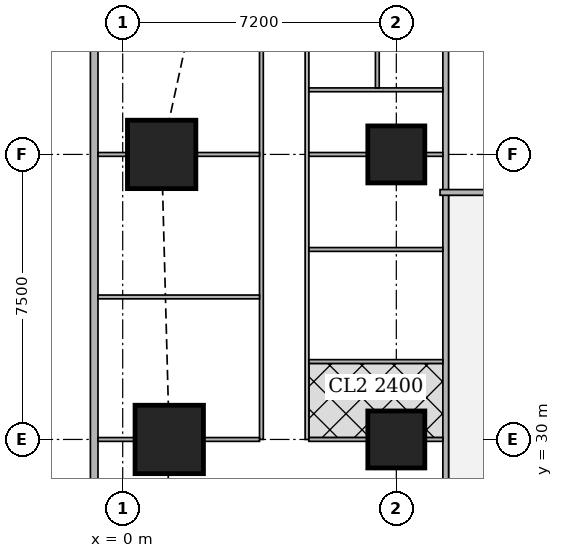
"""IFC4 building model, lengths in metres.
Left out: names, types, materials, properties, quantities, classifications, styles, units other than length and angle.
Written with IfcOpenShell. Run it as: python <this file> out.ifc"""

import sys

from ifc_helpers import new_model, si_unit, direction, frame, frame_2d, origin, origin_2d, place, context, subcontext, project, spatial, rectangle, extrude, element, fill, save


model = new_model("IFC4")
c1 = context("Model", 3, precision=1e-05, world=origin(), true_north=direction((0.0, 1.0)))
c2 = subcontext(c1, "Body", "Model", "MODEL_VIEW")
j1 = project(units=[si_unit("LENGTHUNIT", "METRE"), si_unit("PLANEANGLEUNIT", "RADIAN")], contexts=[c1])
p1 = place(None, origin())
s1 = spatial("IfcSite", under=j1, at=p1, CompositionType="ELEMENT")
p2 = place(p1, origin())
s2 = spatial("IfcBuilding", under=s1, at=p2, CompositionType="ELEMENT")
p3 = place(p2, frame((0.0, 0.0, 158.3)))
s3 = spatial("IfcBuildingStorey", under=s2, at=p3, CompositionType="ELEMENT", Elevation=158.3)
p4 = place(p3, frame((1.225, 30.0, 0.0), z_axis=(0.0, 0.0, 1.0), x_axis=(1.0, 0.0, 0.0)))
e1 = element("IfcColumn", 1, at=p4, inside=s3, PredefinedType="COLUMN", context=c2, shape_type="SweptSolid", body=[
    extrude(rectangle(XDim=1.8, YDim=1.8, at=origin_2d()), origin(), (0.0, 0.0, 1.0), 3.75),
])
p5 = place(p3, frame((7.2, 30.0, 0.0), z_axis=(0.0, 0.0, 1.0), x_axis=(1.0, 0.0, 0.0)))
e2 = element("IfcColumn", 2, at=p5, inside=s3, PredefinedType="COLUMN", context=c2, shape_type="SweptSolid", body=[
    extrude(rectangle(XDim=1.5, YDim=1.5, at=origin_2d()), origin(), (0.0, 0.0, 1.0), 3.75),
])
p6 = place(p3, frame((1.025, 37.5, 0.0), z_axis=(0.0, 0.0, 1.0), x_axis=(1.0, 0.0, 0.0)))
e3 = element("IfcColumn", 3, at=p6, inside=s3, PredefinedType="COLUMN", context=c2, shape_type="SweptSolid", body=[
    extrude(rectangle(XDim=1.8, YDim=1.8, at=origin_2d()), origin(), (0.0, 0.0, 1.0), 3.75),
])
p7 = place(p3, frame((7.2, 37.5, 0.0), z_axis=(0.0, 0.0, 1.0), x_axis=(1.0, 0.0, 0.0)))
e4 = element("IfcColumn", 4, at=p7, inside=s3, PredefinedType="COLUMN", context=c2, shape_type="SweptSolid", body=[
    extrude(rectangle(XDim=1.5, YDim=1.5, at=origin_2d()), origin(), (0.0, 0.0, 1.0), 3.75),
])
p8 = place(p3, frame((-0.75, 42.837, 0.0), z_axis=(0.0, 0.0, 1.0), x_axis=(0.0, -1.0, 0.0)))
e5 = element("IfcWall", 5, at=p8, inside=s3, PredefinedType="SOLIDWALL", context=c2, shape_type="SweptSolid", body=[
    extrude(rectangle(XDim=40.674, YDim=0.2, at=frame_2d((20.337, 0.0))), origin(), (0.0, 0.0, 1.0), 3.5),
])
p9 = place(p8, frame((1.78, 0.0, 0.9)))
e6 = element("IfcOpeningElement", 6, at=p9, cuts=e5, PredefinedType="OPENING", context=c2, shape_type="SweptSolid", body=[
    extrude(rectangle(XDim=1.8, YDim=1.5, at=frame_2d((0.9, 0.75))), frame((0.0, 0.11, 0.0), z_axis=(0.0, -1.0, 0.0), x_axis=(1.0, 0.0, 0.0)), (0.0, 0.0, 1.0), 0.22),
])
p10 = place(p8, frame((6.312, 0.0, 0.9)))
e7 = element("IfcOpeningElement", 7, at=p10, cuts=e5, PredefinedType="OPENING", context=c2, shape_type="SweptSolid", body=[
    extrude(rectangle(XDim=1.8, YDim=1.5, at=frame_2d((0.9, 0.75))), frame((0.0, 0.11, 0.0), z_axis=(0.0, -1.0, 0.0), x_axis=(1.0, 0.0, 0.0)), (0.0, 0.0, 1.0), 0.22),
])
p11 = place(p8, frame((10.062, 0.0, 0.9)))
e8 = element("IfcOpeningElement", 8, at=p11, cuts=e5, PredefinedType="OPENING", context=c2, shape_type="SweptSolid", body=[
    extrude(rectangle(XDim=1.8, YDim=1.5, at=frame_2d((0.9, 0.75))), frame((0.0, 0.11, 0.0), z_axis=(0.0, -1.0, 0.0), x_axis=(1.0, 0.0, 0.0)), (0.0, 0.0, 1.0), 0.22),
])
p12 = place(p8, frame((13.812, 0.0, 0.9)))
e9 = element("IfcOpeningElement", 9, at=p12, cuts=e5, PredefinedType="OPENING", context=c2, shape_type="SweptSolid", body=[
    extrude(rectangle(XDim=1.8, YDim=1.5, at=frame_2d((0.9, 0.75))), frame((0.0, 0.11, 0.0), z_axis=(0.0, -1.0, 0.0), x_axis=(1.0, 0.0, 0.0)), (0.0, 0.0, 1.0), 0.22),
])
p13 = place(p8, frame((17.562, 0.0, 0.9)))
e10 = element("IfcOpeningElement", 10, at=p13, cuts=e5, PredefinedType="OPENING", context=c2, shape_type="SweptSolid", body=[
    extrude(rectangle(XDim=1.8, YDim=1.5, at=frame_2d((0.9, 0.75))), frame((0.0, 0.11, 0.0), z_axis=(0.0, -1.0, 0.0), x_axis=(1.0, 0.0, 0.0)), (0.0, 0.0, 1.0), 0.22),
])
p14 = place(p8, frame((21.312, 0.0, 0.9)))
e11 = element("IfcOpeningElement", 11, at=p14, cuts=e5, PredefinedType="OPENING", context=c2, shape_type="SweptSolid", body=[
    extrude(rectangle(XDim=1.8, YDim=1.5, at=frame_2d((0.9, 0.75))), frame((0.0, 0.11, 0.0), z_axis=(0.0, -1.0, 0.0), x_axis=(1.0, 0.0, 0.0)), (0.0, 0.0, 1.0), 0.22),
])
p15 = place(p8, frame((25.062, 0.0, 0.9)))
e12 = element("IfcOpeningElement", 12, at=p15, cuts=e5, PredefinedType="OPENING", context=c2, shape_type="SweptSolid", body=[
    extrude(rectangle(XDim=1.8, YDim=1.5, at=frame_2d((0.9, 0.75))), frame((0.0, 0.11, 0.0), z_axis=(0.0, -1.0, 0.0), x_axis=(1.0, 0.0, 0.0)), (0.0, 0.0, 1.0), 0.22),
])
p16 = place(p8, frame((28.812, 0.0, 0.9)))
e13 = element("IfcOpeningElement", 13, at=p16, cuts=e5, PredefinedType="OPENING", context=c2, shape_type="SweptSolid", body=[
    extrude(rectangle(XDim=1.8, YDim=1.5, at=frame_2d((0.9, 0.75))), frame((0.0, 0.11, 0.0), z_axis=(0.0, -1.0, 0.0), x_axis=(1.0, 0.0, 0.0)), (0.0, 0.0, 1.0), 0.22),
])
p17 = place(p8, frame((32.562, 0.0, 0.9)))
e14 = element("IfcOpeningElement", 14, at=p17, cuts=e5, PredefinedType="OPENING", context=c2, shape_type="SweptSolid", body=[
    extrude(rectangle(XDim=1.8, YDim=1.5, at=frame_2d((0.9, 0.75))), frame((0.0, 0.11, 0.0), z_axis=(0.0, -1.0, 0.0), x_axis=(1.0, 0.0, 0.0)), (0.0, 0.0, 1.0), 0.22),
])
p18 = place(p8, frame((37.094, 0.0, 0.9)))
e15 = element("IfcOpeningElement", 15, at=p18, cuts=e5, PredefinedType="OPENING", context=c2, shape_type="SweptSolid", body=[
    extrude(rectangle(XDim=1.8, YDim=1.5, at=frame_2d((0.9, 0.75))), frame((0.0, 0.11, 0.0), z_axis=(0.0, -1.0, 0.0), x_axis=(1.0, 0.0, 0.0)), (0.0, 0.0, 1.0), 0.22),
])
p19 = place(p3, frame((8.5, 1.964, 0.0), z_axis=(0.0, 0.0, 1.0), x_axis=(0.0, 1.0, 0.0)))
e16 = element("IfcWall", 16, at=p19, inside=s3, PredefinedType="SOLIDWALL", context=c2, shape_type="SweptSolid", body=[
    extrude(rectangle(XDim=41.097, YDim=0.15, at=frame_2d((20.548, 0.0))), origin(), (0.0, 0.0, 1.0), 3.5),
])
p20 = place(p19, frame((6.911, 0.0, 0.0)))
e17 = element("IfcOpeningElement", 17, at=p20, cuts=e16, PredefinedType="OPENING", context=c2, shape_type="SweptSolid", body=[
    extrude(rectangle(XDim=1.0, YDim=2.1, at=frame_2d((0.5, 1.05))), frame((0.0, 0.085, 0.0), z_axis=(0.0, -1.0, 0.0), x_axis=(1.0, 0.0, 0.0)), (0.0, 0.0, 1.0), 0.17),
])
p21 = place(p19, frame((10.661, 0.0, 0.0)))
e18 = element("IfcOpeningElement", 18, at=p21, cuts=e16, PredefinedType="OPENING", context=c2, shape_type="SweptSolid", body=[
    extrude(rectangle(XDim=1.0, YDim=2.1, at=frame_2d((0.5, 1.05))), frame((0.0, 0.085, 0.0), z_axis=(0.0, -1.0, 0.0), x_axis=(1.0, 0.0, 0.0)), (0.0, 0.0, 1.0), 0.17),
])
p22 = place(p19, frame((25.661, 0.0, 0.0)))
e19 = element("IfcOpeningElement", 19, at=p22, cuts=e16, PredefinedType="OPENING", context=c2, shape_type="SweptSolid", body=[
    extrude(rectangle(XDim=1.0, YDim=2.1, at=frame_2d((0.5, 1.05))), frame((0.0, 0.085, 0.0), z_axis=(0.0, -1.0, 0.0), x_axis=(1.0, 0.0, 0.0)), (0.0, 0.0, 1.0), 0.17),
])
p23 = place(p3, frame((8.35, 36.5, 0.0), z_axis=(0.0, 0.0, 1.0), x_axis=(1.0, 0.0, 0.0)))
e20 = element("IfcWall", 20, at=p23, inside=s3, PredefinedType="SOLIDWALL", context=c2, shape_type="SweptSolid", body=[
    extrude(rectangle(XDim=26.415, YDim=0.15, at=frame_2d((13.208, 0.0))), origin(), (0.0, 0.0, 1.0), 3.5),
])
p24 = place(p23, frame((2.6, 0.0, 0.0)))
e21 = element("IfcOpeningElement", 21, at=p24, cuts=e20, PredefinedType="OPENING", context=c2, shape_type="SweptSolid", body=[
    extrude(rectangle(XDim=1.0, YDim=2.1, at=frame_2d((0.5, 1.05))), frame((0.0, 0.085, 0.0), z_axis=(0.0, -1.0, 0.0), x_axis=(1.0, 0.0, 0.0)), (0.0, 0.0, 1.0), 0.17),
])
p25 = place(p23, frame((10.949, 0.0, 0.0)))
e22 = element("IfcOpeningElement", 22, at=p25, cuts=e20, PredefinedType="OPENING", context=c2, shape_type="SweptSolid", body=[
    extrude(rectangle(XDim=1.0, YDim=2.1, at=frame_2d((0.5, 1.05))), frame((0.0, 0.085, 0.0), z_axis=(0.0, -1.0, 0.0), x_axis=(1.0, 0.0, 0.0)), (0.0, 0.0, 1.0), 0.17),
])
p26 = place(p3, frame((3.65, 30.0, 0.0), z_axis=(0.0, 0.0, 1.0), x_axis=(0.0, 1.0, 0.0)))
e23 = element("IfcWall", 23, at=p26, inside=s3, PredefinedType="PARTITIONING", context=c2, shape_type="SweptSolid", body=[
    extrude(rectangle(XDim=12.224, YDim=0.1, at=frame_2d((6.112, 0.0))), origin(), (0.0, 0.0, 1.0), 3.5),
])
p27 = place(p26, frame((0.2, 0.0, 0.0)))
e24 = element("IfcOpeningElement", 24, at=p27, cuts=e23, PredefinedType="OPENING", context=c2, shape_type="SweptSolid", body=[
    extrude(rectangle(XDim=0.9, YDim=2.1, at=frame_2d((0.45, 1.05))), frame((0.0, 0.06, 0.0), z_axis=(0.0, -1.0, 0.0), x_axis=(1.0, 0.0, 0.0)), (0.0, 0.0, 1.0), 0.12),
])
p28 = place(p26, frame((3.95, 0.0, 0.0)))
e25 = element("IfcOpeningElement", 25, at=p28, cuts=e23, PredefinedType="OPENING", context=c2, shape_type="SweptSolid", body=[
    extrude(rectangle(XDim=0.9, YDim=2.1, at=frame_2d((0.45, 1.05))), frame((0.0, 0.06, 0.0), z_axis=(0.0, -1.0, 0.0), x_axis=(1.0, 0.0, 0.0)), (0.0, 0.0, 1.0), 0.12),
])
p29 = place(p26, frame((7.7, 0.0, 0.0)))
e26 = element("IfcOpeningElement", 26, at=p29, cuts=e23, PredefinedType="OPENING", context=c2, shape_type="SweptSolid", body=[
    extrude(rectangle(XDim=0.9, YDim=2.1, at=frame_2d((0.45, 1.05))), frame((0.0, 0.06, 0.0), z_axis=(0.0, -1.0, 0.0), x_axis=(1.0, 0.0, 0.0)), (0.0, 0.0, 1.0), 0.12),
])
p30 = place(p3, frame((4.85, 30.0, 0.0), z_axis=(0.0, 0.0, 1.0), x_axis=(0.0, 1.0, 0.0)))
e27 = element("IfcWall", 27, at=p30, inside=s3, PredefinedType="PARTITIONING", context=c2, shape_type="SweptSolid", body=[
    extrude(rectangle(XDim=12.507, YDim=0.1, at=frame_2d((6.253, 0.0))), origin(), (0.0, 0.0, 1.0), 3.5),
])
p31 = place(p30, frame((0.575, 0.0, 0.0)))
e28 = element("IfcOpeningElement", 28, at=p31, cuts=e27, PredefinedType="OPENING", context=c2, shape_type="SweptSolid", body=[
    extrude(rectangle(XDim=0.9, YDim=2.1, at=frame_2d((0.45, 1.05))), frame((0.0, 0.06, 0.0), z_axis=(0.0, -1.0, 0.0), x_axis=(1.0, 0.0, 0.0)), (0.0, 0.0, 1.0), 0.12),
])
p32 = place(p30, frame((5.799, 0.0, 0.0)))
e29 = element("IfcOpeningElement", 29, at=p32, cuts=e27, PredefinedType="OPENING", context=c2, shape_type="SweptSolid", body=[
    extrude(rectangle(XDim=0.9, YDim=2.1, at=frame_2d((0.45, 1.05))), frame((0.0, 0.06, 0.0), z_axis=(0.0, -1.0, 0.0), x_axis=(1.0, 0.0, 0.0)), (0.0, 0.0, 1.0), 0.12),
])
p33 = place(p30, frame((7.9, 0.0, 0.0)))
e30 = element("IfcOpeningElement", 30, at=p33, cuts=e27, PredefinedType="OPENING", context=c2, shape_type="SweptSolid", body=[
    extrude(rectangle(XDim=0.9, YDim=2.1, at=frame_2d((0.45, 1.05))), frame((0.0, 0.06, 0.0), z_axis=(0.0, -1.0, 0.0), x_axis=(1.0, 0.0, 0.0)), (0.0, 0.0, 1.0), 0.12),
])
p34 = place(p30, frame((3.075, 0.0, 0.0)))
e31 = element("IfcOpeningElement", 31, at=p34, cuts=e27, PredefinedType="OPENING", context=c2, shape_type="SweptSolid", body=[
    extrude(rectangle(XDim=0.9, YDim=2.1, at=frame_2d((0.45, 1.05))), frame((0.0, 0.06, 0.0), z_axis=(0.0, -1.0, 0.0), x_axis=(1.0, 0.0, 0.0)), (0.0, 0.0, 1.0), 0.12),
])
p35 = place(p30, frame((10.4, 0.0, 0.0)))
e32 = element("IfcOpeningElement", 32, at=p35, cuts=e27, PredefinedType="OPENING", context=c2, shape_type="SweptSolid", body=[
    extrude(rectangle(XDim=0.9, YDim=2.1, at=frame_2d((0.45, 1.05))), frame((0.0, 0.06, 0.0), z_axis=(0.0, -1.0, 0.0), x_axis=(1.0, 0.0, 0.0)), (0.0, 0.0, 1.0), 0.12),
])
p36 = place(p3, frame((-0.65, 30.0, 0.0), z_axis=(0.0, 0.0, 1.0), x_axis=(1.0, 0.0, 0.0)))
e33 = element("IfcWall", 33, at=p36, inside=s3, PredefinedType="PARTITIONING", context=c2, shape_type="SweptSolid", body=[
    extrude(rectangle(XDim=0.974, YDim=0.1, at=frame_2d((0.487, 0.0))), origin(), (0.0, 0.0, 1.0), 3.5),
])
p37 = place(p3, frame((2.126, 30.0, 0.0), z_axis=(0.0, 0.0, 1.0), x_axis=(1.0, 0.0, 0.0)))
e34 = element("IfcWall", 34, at=p37, inside=s3, PredefinedType="PARTITIONING", context=c2, shape_type="SweptSolid", body=[
    extrude(rectangle(XDim=1.474, YDim=0.1, at=frame_2d((0.737, 0.0))), origin(), (0.0, 0.0, 1.0), 3.5),
])
p38 = place(p3, frame((-0.65, 33.75, 0.0), z_axis=(0.0, 0.0, 1.0), x_axis=(1.0, 0.0, 0.0)))
e35 = element("IfcWall", 35, at=p38, inside=s3, PredefinedType="PARTITIONING", context=c2, shape_type="SweptSolid", body=[
    extrude(rectangle(XDim=4.25, YDim=0.1, at=frame_2d((2.125, 0.0))), origin(), (0.0, 0.0, 1.0), 2.1),
])
p39 = place(p3, frame((-0.65, 37.5, 0.0), z_axis=(0.0, 0.0, 1.0), x_axis=(1.0, 0.0, 0.0)))
e36 = element("IfcWall", 36, at=p39, inside=s3, PredefinedType="PARTITIONING", context=c2, shape_type="SweptSolid", body=[
    extrude(rectangle(XDim=0.774, YDim=0.1, at=frame_2d((0.387, 0.0))), origin(), (0.0, 0.0, 1.0), 3.5),
])
p40 = place(p3, frame((1.926, 37.5, 0.0), z_axis=(0.0, 0.0, 1.0), x_axis=(1.0, 0.0, 0.0)))
e37 = element("IfcWall", 37, at=p40, inside=s3, PredefinedType="PARTITIONING", context=c2, shape_type="SweptSolid", body=[
    extrude(rectangle(XDim=1.674, YDim=0.1, at=frame_2d((0.837, 0.0))), origin(), (0.0, 0.0, 1.0), 2.1),
])
p41 = place(p3, frame((4.9, 30.0, 0.0), z_axis=(0.0, 0.0, 1.0), x_axis=(1.0, 0.0, 0.0)))
e38 = element("IfcWall", 38, at=p41, inside=s3, PredefinedType="PARTITIONING", context=c2, shape_type="SweptSolid", body=[
    extrude(rectangle(XDim=1.549, YDim=0.1, at=frame_2d((0.774, 0.0))), origin(), (0.0, 0.0, 1.0), 3.5),
])
p42 = place(p3, frame((7.951, 30.0, 0.0), z_axis=(0.0, 0.0, 1.0), x_axis=(1.0, 0.0, 0.0)))
e39 = element("IfcWall", 39, at=p42, inside=s3, PredefinedType="PARTITIONING", context=c2, shape_type="SweptSolid", body=[
    extrude(rectangle(XDim=0.474, YDim=0.1, at=frame_2d((0.237, 0.0))), origin(), (0.0, 0.0, 1.0), 3.5),
])
p43 = place(p3, frame((4.9, 34.999, 0.0), z_axis=(0.0, 0.0, 1.0), x_axis=(1.0, 0.0, 0.0)))
e40 = element("IfcWall", 40, at=p43, inside=s3, PredefinedType="PARTITIONING", context=c2, shape_type="SweptSolid", body=[
    extrude(rectangle(XDim=3.525, YDim=0.1, at=frame_2d((1.763, 0.0))), origin(), (0.0, 0.0, 1.0), 3.5),
])
p44 = place(p3, frame((4.9, 37.5, 0.0), z_axis=(0.0, 0.0, 1.0), x_axis=(1.0, 0.0, 0.0)))
e41 = element("IfcWall", 41, at=p44, inside=s3, PredefinedType="PARTITIONING", context=c2, shape_type="SweptSolid", body=[
    extrude(rectangle(XDim=1.549, YDim=0.1, at=frame_2d((0.774, 0.0))), origin(), (0.0, 0.0, 1.0), 3.5),
])
p45 = place(p3, frame((7.951, 37.5, 0.0), z_axis=(0.0, 0.0, 1.0), x_axis=(1.0, 0.0, 0.0)))
e42 = element("IfcWall", 42, at=p45, inside=s3, PredefinedType="PARTITIONING", context=c2, shape_type="SweptSolid", body=[
    extrude(rectangle(XDim=0.474, YDim=0.1, at=frame_2d((0.237, 0.0))), origin(), (0.0, 0.0, 1.0), 3.5),
])
for number, where, z_axis, x_axis in (
    (43, (4.9, 32.05, 0.0), (0.0, 0.0, 1.0), (1.0, 0.0, 0.0)),
    (44, (4.9, 39.2, 0.0), (0.0, 0.0, 1.0), (1.0, 0.0, 0.0)),
):
    element("IfcWall", number, at=place(p3, frame(where, z_axis=z_axis, x_axis=x_axis)), inside=s3, PredefinedType="PARTITIONING", context=c2, shape_type="SweptSolid", body=[
        extrude(rectangle(XDim=3.525, YDim=0.1, at=frame_2d((1.763, 0.0))), origin(), (0.0, 0.0, 1.0), 3.5),
    ])
p46 = place(p3, frame((6.7, 39.25, 0.0), z_axis=(0.0, 0.0, 1.0), x_axis=(0.0, 1.0, 0.0)))
e45 = element("IfcWall", 45, at=p46, inside=s3, PredefinedType="PARTITIONING", context=c2, shape_type="SweptSolid", body=[
    extrude(rectangle(XDim=3.199, YDim=0.1, at=frame_2d((1.6, 0.0))), origin(), (0.0, 0.0, 1.0), 3.5),
])
p47 = place(p46, frame((1.15, 0.0, 0.0)))
e46 = element("IfcOpeningElement", 46, at=p47, cuts=e45, PredefinedType="OPENING", context=c2, shape_type="SweptSolid", body=[
    extrude(rectangle(XDim=0.9, YDim=2.1, at=frame_2d((0.45, 1.05))), frame((0.0, 0.06, 0.0), z_axis=(0.0, -1.0, 0.0), x_axis=(1.0, 0.0, 0.0)), (0.0, 0.0, 1.0), 0.12),
])
p48 = place(p9, origin())
e47 = element("IfcWindow", 47, at=p48, inside=s3, PartitioningType="SINGLE_PANEL", PredefinedType="WINDOW", context=c2, shape_type="SweptSolid", body=[
    extrude(rectangle(XDim=1.8, YDim=1.5, at=frame_2d((0.9, 0.75))), frame((0.0, 0.03, 0.0), z_axis=(0.0, -1.0, 0.0), x_axis=(1.0, 0.0, 0.0)), (0.0, 0.0, 1.0), 0.06),
])
fill(e6, e47)
p49 = place(p10, origin())
e48 = element("IfcWindow", 48, at=p49, inside=s3, PartitioningType="SINGLE_PANEL", PredefinedType="WINDOW", context=c2, shape_type="SweptSolid", body=[
    extrude(rectangle(XDim=1.8, YDim=1.5, at=frame_2d((0.9, 0.75))), frame((0.0, 0.03, 0.0), z_axis=(0.0, -1.0, 0.0), x_axis=(1.0, 0.0, 0.0)), (0.0, 0.0, 1.0), 0.06),
])
fill(e7, e48)
p50 = place(p11, origin())
e49 = element("IfcWindow", 49, at=p50, inside=s3, PartitioningType="SINGLE_PANEL", PredefinedType="WINDOW", context=c2, shape_type="SweptSolid", body=[
    extrude(rectangle(XDim=1.8, YDim=1.5, at=frame_2d((0.9, 0.75))), frame((0.0, 0.03, 0.0), z_axis=(0.0, -1.0, 0.0), x_axis=(1.0, 0.0, 0.0)), (0.0, 0.0, 1.0), 0.06),
])
fill(e8, e49)
p51 = place(p12, origin())
e50 = element("IfcWindow", 50, at=p51, inside=s3, PartitioningType="SINGLE_PANEL", PredefinedType="WINDOW", context=c2, shape_type="SweptSolid", body=[
    extrude(rectangle(XDim=1.8, YDim=1.5, at=frame_2d((0.9, 0.75))), frame((0.0, 0.03, 0.0), z_axis=(0.0, -1.0, 0.0), x_axis=(1.0, 0.0, 0.0)), (0.0, 0.0, 1.0), 0.06),
])
fill(e9, e50)
p52 = place(p27, origin())
e51 = element("IfcDoor", 51, at=p52, inside=s3, OperationType="SINGLE_SWING_LEFT", PredefinedType="DOOR", context=c2, shape_type="SweptSolid", body=[
    extrude(rectangle(XDim=0.9, YDim=2.1, at=frame_2d((0.45, 1.05))), frame((0.0, 0.025, 0.0), z_axis=(0.0, -1.0, 0.0), x_axis=(1.0, 0.0, 0.0)), (0.0, 0.0, 1.0), 0.05),
])
fill(e24, e51)
p53 = place(p28, origin())
e52 = element("IfcDoor", 52, at=p53, inside=s3, OperationType="SINGLE_SWING_LEFT", PredefinedType="DOOR", context=c2, shape_type="SweptSolid", body=[
    extrude(rectangle(XDim=0.9, YDim=2.1, at=frame_2d((0.45, 1.05))), frame((0.0, 0.025, 0.0), z_axis=(0.0, -1.0, 0.0), x_axis=(1.0, 0.0, 0.0)), (0.0, 0.0, 1.0), 0.05),
])
fill(e25, e52)
p54 = place(p29, origin())
e53 = element("IfcDoor", 53, at=p54, inside=s3, OperationType="SINGLE_SWING_LEFT", PredefinedType="DOOR", context=c2, shape_type="SweptSolid", body=[
    extrude(rectangle(XDim=0.9, YDim=2.1, at=frame_2d((0.45, 1.05))), frame((0.0, 0.025, 0.0), z_axis=(0.0, -1.0, 0.0), x_axis=(1.0, 0.0, 0.0)), (0.0, 0.0, 1.0), 0.05),
])
fill(e26, e53)
p55 = place(p31, origin())
e54 = element("IfcDoor", 54, at=p55, inside=s3, OperationType="SINGLE_SWING_RIGHT", PredefinedType="DOOR", context=c2, shape_type="SweptSolid", body=[
    extrude(rectangle(XDim=0.9, YDim=2.1, at=frame_2d((0.45, 1.05))), frame((0.0, 0.025, 0.0), z_axis=(0.0, -1.0, 0.0), x_axis=(1.0, 0.0, 0.0)), (0.0, 0.0, 1.0), 0.05),
])
fill(e28, e54)
p56 = place(p32, origin())
e55 = element("IfcDoor", 55, at=p56, inside=s3, OperationType="SINGLE_SWING_RIGHT", PredefinedType="DOOR", context=c2, shape_type="SweptSolid", body=[
    extrude(rectangle(XDim=0.9, YDim=2.1, at=frame_2d((0.45, 1.05))), frame((0.0, 0.025, 0.0), z_axis=(0.0, -1.0, 0.0), x_axis=(1.0, 0.0, 0.0)), (0.0, 0.0, 1.0), 0.05),
])
fill(e29, e55)
p57 = place(p33, origin())
e56 = element("IfcDoor", 56, at=p57, inside=s3, OperationType="SINGLE_SWING_RIGHT", PredefinedType="DOOR", context=c2, shape_type="SweptSolid", body=[
    extrude(rectangle(XDim=0.9, YDim=2.1, at=frame_2d((0.45, 1.05))), frame((0.0, 0.025, 0.0), z_axis=(0.0, -1.0, 0.0), x_axis=(1.0, 0.0, 0.0)), (0.0, 0.0, 1.0), 0.05),
])
fill(e30, e56)
p58 = place(p34, origin())
e57 = element("IfcDoor", 57, at=p58, inside=s3, OperationType="SINGLE_SWING_LEFT", PredefinedType="DOOR", context=c2, shape_type="SweptSolid", body=[
    extrude(rectangle(XDim=0.9, YDim=2.1, at=frame_2d((0.45, 1.05))), frame((0.0, 0.025, 0.0), z_axis=(0.0, -1.0, 0.0), x_axis=(1.0, 0.0, 0.0)), (0.0, 0.0, 1.0), 0.05),
])
fill(e31, e57)
save(model, sys.argv[1])
